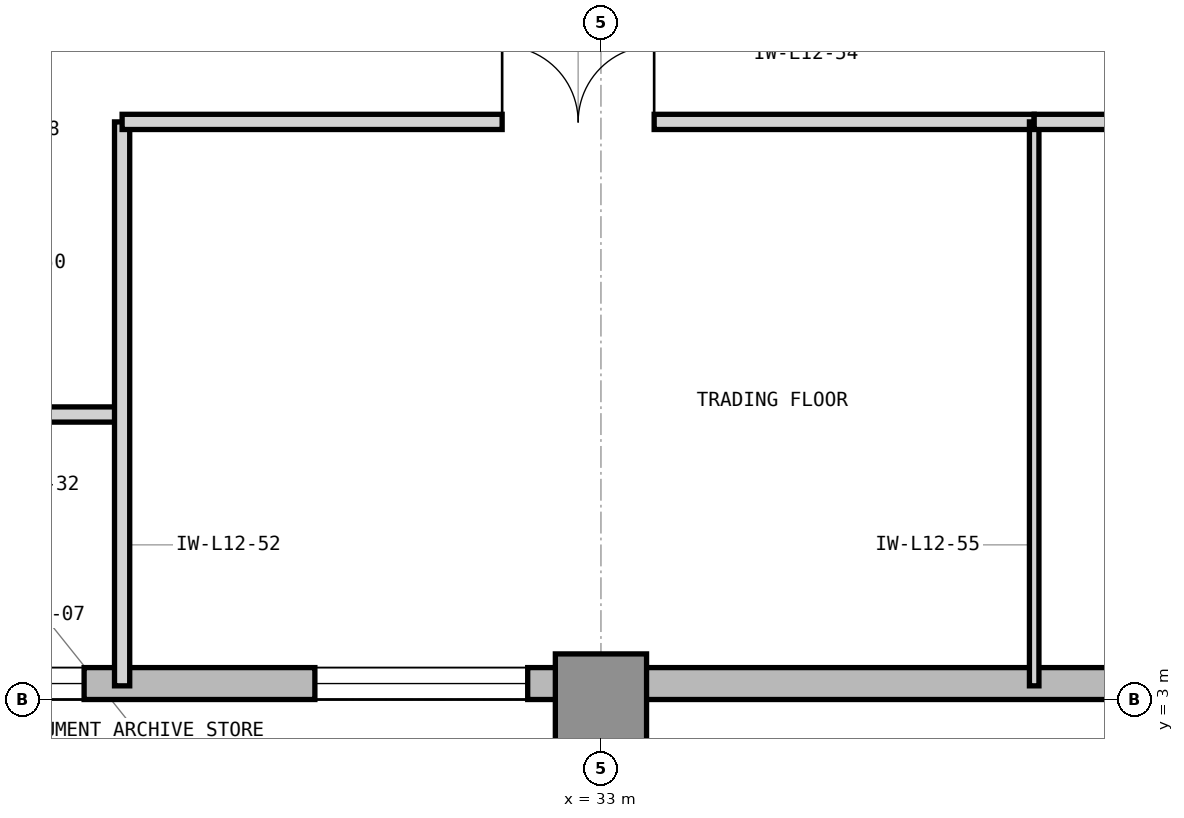
"""IFC4 building model, lengths in metres.
Left out: names, types, materials, properties, quantities, classifications, styles, units other than length and angle.
Written with IfcOpenShell. Run it as: python <this file> out.ifc"""

import sys

from ifc_helpers import new_model, si_unit, direction, frame, frame_2d, origin, origin_2d, place, context, subcontext, project, spatial, rectangle, extrude, element, fill, save


model = new_model("IFC4")
c1 = context("Model", 3, precision=1e-05, world=origin(), true_north=direction((0.0, 1.0)))
c2 = subcontext(c1, "Body", "Model", "MODEL_VIEW")
j1 = project(units=[si_unit("LENGTHUNIT", "METRE"), si_unit("PLANEANGLEUNIT", "RADIAN")], contexts=[c1])
p1 = place(None, origin())
s1 = spatial("IfcSite", under=j1, at=p1, CompositionType="ELEMENT")
p2 = place(p1, origin())
s2 = spatial("IfcBuilding", under=s1, at=p2, CompositionType="ELEMENT")
p3 = place(p2, frame((0.0, 0.0, 55.2)))
s3 = spatial("IfcBuildingStorey", under=s2, at=p3, CompositionType="ELEMENT", Elevation=55.2)
p4 = place(p3, frame((33.0, 3.0, 0.0), z_axis=(0.0, 0.0, 1.0), x_axis=(1.0, 0.0, 0.0)))
e1 = element("IfcColumn", 1, at=p4, inside=s3, PredefinedType="COLUMN", context=c2, shape_type="SweptSolid", body=[
    extrude(rectangle(XDim=1.2, YDim=1.2, at=origin_2d()), origin(), (0.0, 0.0, 1.0), 4.2),
])
p5 = place(p3, frame((23.9, 3.21, 0.0), z_axis=(0.0, 0.0, 1.0), x_axis=(1.0, 0.0, 0.0)))
e2 = element("IfcWall", 2, at=p5, inside=s3, PredefinedType="STANDARD", context=c2, shape_type="SweptSolid", body=[
    extrude(rectangle(XDim=40.5, YDim=0.42, at=frame_2d((20.25, 0.0))), origin(), (0.0, 0.0, 1.0), 3.98),
])
p6 = place(p5, frame((1.1, 0.0, 0.85)))
e3 = element("IfcOpeningElement", 3, at=p6, cuts=e2, PredefinedType="OPENING", context=c2, shape_type="SweptSolid", body=[
    extrude(rectangle(XDim=1.2, YDim=2.45, at=frame_2d((0.6, 1.225))), frame((0.0, 0.22, 0.0), z_axis=(0.0, -1.0, 0.0), x_axis=(1.0, 0.0, 0.0)), (0.0, 0.0, 1.0), 0.44),
])
p7 = place(p5, frame((5.336, 0.0, 0.85)))
e4 = element("IfcOpeningElement", 4, at=p7, cuts=e2, PredefinedType="OPENING", context=c2, shape_type="SweptSolid", body=[
    extrude(rectangle(XDim=2.8, YDim=2.45, at=frame_2d((1.4, 1.225))), frame((0.0, 0.22, 0.0), z_axis=(0.0, -1.0, 0.0), x_axis=(1.0, 0.0, 0.0)), (0.0, 0.0, 1.0), 0.44),
])
p8 = place(p5, frame((19.086, 0.0, 0.85)))
e5 = element("IfcOpeningElement", 5, at=p8, cuts=e2, PredefinedType="OPENING", context=c2, shape_type="SweptSolid", body=[
    extrude(rectangle(XDim=2.8, YDim=2.45, at=frame_2d((1.4, 1.225))), frame((0.0, 0.22, 0.0), z_axis=(0.0, -1.0, 0.0), x_axis=(1.0, 0.0, 0.0)), (0.0, 0.0, 1.0), 0.44),
])
p9 = place(p5, frame((27.886, 0.0, 0.85)))
e6 = element("IfcOpeningElement", 6, at=p9, cuts=e2, PredefinedType="OPENING", context=c2, shape_type="SweptSolid", body=[
    extrude(rectangle(XDim=1.2, YDim=2.45, at=frame_2d((0.6, 1.225))), frame((0.0, 0.22, 0.0), z_axis=(0.0, -1.0, 0.0), x_axis=(1.0, 0.0, 0.0)), (0.0, 0.0, 1.0), 0.44),
])
p10 = place(p3, frame((23.85, 6.75, 0.0), z_axis=(0.0, 0.0, 1.0), x_axis=(1.0, 0.0, 0.0)))
e7 = element("IfcWall", 7, at=p10, inside=s3, PredefinedType="PARTITIONING", context=c2, shape_type="SweptSolid", body=[
    extrude(rectangle(XDim=2.85, YDim=0.2, at=frame_2d((1.425, 0.0))), origin(), (0.0, 0.0, 1.0), 3.97),
])
p11 = place(p10, frame((0.7, 0.0, 0.0)))
e8 = element("IfcOpeningElement", 8, at=p11, cuts=e7, PredefinedType="OPENING", context=c2, shape_type="SweptSolid", body=[
    extrude(rectangle(XDim=1.0, YDim=2.15, at=frame_2d((0.5, 1.075))), frame((0.0, 0.11, 0.0), z_axis=(0.0, -1.0, 0.0), x_axis=(1.0, 0.0, 0.0)), (0.0, 0.0, 1.0), 0.22),
])
p12 = place(p3, frame((26.7, 3.18, 0.0), z_axis=(0.0, 0.0, 1.0), x_axis=(0.0, 1.0, 0.0)))
e9 = element("IfcWall", 9, at=p12, inside=s3, PredefinedType="PARTITIONING", context=c2, shape_type="SweptSolid", body=[
    extrude(rectangle(XDim=7.42, YDim=0.2, at=frame_2d((3.71, 0.0))), origin(), (0.0, 0.0, 1.0), 3.97),
])
p13 = place(p3, frame((26.7, 10.6, 0.0), z_axis=(0.0, 0.0, 1.0), x_axis=(1.0, 0.0, 0.0)))
e10 = element("IfcWall", 10, at=p13, inside=s3, PredefinedType="PARTITIONING", context=c2, shape_type="SweptSolid", body=[
    extrude(rectangle(XDim=12.0, YDim=0.2, at=frame_2d((6.0, 0.0))), origin(), (0.0, 0.0, 1.0), 3.97),
])
p14 = place(p13, frame((5.0, 0.0, 0.0)))
e11 = element("IfcOpeningElement", 11, at=p14, cuts=e10, PredefinedType="OPENING", context=c2, shape_type="SweptSolid", body=[
    extrude(rectangle(XDim=2.0, YDim=2.5, at=frame_2d((1.0, 1.25))), frame((0.0, 0.11, 0.0), z_axis=(0.0, -1.0, 0.0), x_axis=(1.0, 0.0, 0.0)), (0.0, 0.0, 1.0), 0.22),
])
p15 = place(p3, frame((38.7, 3.18, 0.0), z_axis=(0.0, 0.0, 1.0), x_axis=(0.0, 1.0, 0.0)))
e12 = element("IfcWall", 12, at=p15, inside=s3, PredefinedType="PARTITIONING", context=c2, shape_type="SweptSolid", body=[
    extrude(rectangle(XDim=7.42, YDim=0.125, at=frame_2d((3.71, 0.0))), origin(), (0.0, 0.0, 1.0), 3.97),
])
p16 = place(p3, frame((38.7, 10.6, 0.0), z_axis=(0.0, 0.0, 1.0), x_axis=(1.0, 0.0, 0.0)))
e13 = element("IfcWall", 13, at=p16, inside=s3, PredefinedType="PARTITIONING", context=c2, shape_type="SweptSolid", body=[
    extrude(rectangle(XDim=10.5, YDim=0.2, at=frame_2d((5.25, 0.0))), origin(), (0.0, 0.0, 1.0), 3.97),
])
p17 = place(p16, frame((4.25, 0.0, 0.0)))
e14 = element("IfcOpeningElement", 14, at=p17, cuts=e13, PredefinedType="OPENING", context=c2, shape_type="SweptSolid", body=[
    extrude(rectangle(XDim=2.0, YDim=2.5, at=frame_2d((1.0, 1.25))), frame((0.0, 0.11, 0.0), z_axis=(0.0, -1.0, 0.0), x_axis=(1.0, 0.0, 0.0)), (0.0, 0.0, 1.0), 0.22),
])
p18 = place(p14, origin())
e15 = element("IfcDoor", 15, at=p18, inside=s3, OperationType="DOUBLE_DOOR_SINGLE_SWING", PredefinedType="DOOR", context=c2, shape_type="SweptSolid", body=[
    extrude(rectangle(XDim=2.0, YDim=2.5, at=frame_2d((1.0, 1.25))), frame((0.0, 0.025, 0.0), z_axis=(0.0, -1.0, 0.0), x_axis=(1.0, 0.0, 0.0)), (0.0, 0.0, 1.0), 0.05),
])
fill(e11, e15)
p19 = place(p6, origin())
e16 = element("IfcWindow", 16, at=p19, inside=s3, PartitioningType="SINGLE_PANEL", PredefinedType="WINDOW", context=c2, shape_type="SweptSolid", body=[
    extrude(rectangle(XDim=1.2, YDim=2.45, at=frame_2d((0.6, 1.225))), frame((0.0, 0.11, 0.0), z_axis=(0.0, -1.0, 0.0), x_axis=(1.0, 0.0, 0.0)), (0.0, 0.0, 1.0), 0.06),
])
fill(e3, e16)
p20 = place(p7, origin())
e17 = element("IfcWindow", 17, at=p20, inside=s3, PartitioningType="SINGLE_PANEL", PredefinedType="WINDOW", context=c2, shape_type="SweptSolid", body=[
    extrude(rectangle(XDim=2.8, YDim=2.45, at=frame_2d((1.4, 1.225))), frame((0.0, 0.11, 0.0), z_axis=(0.0, -1.0, 0.0), x_axis=(1.0, 0.0, 0.0)), (0.0, 0.0, 1.0), 0.06),
])
fill(e4, e17)
save(model, sys.argv[1])
